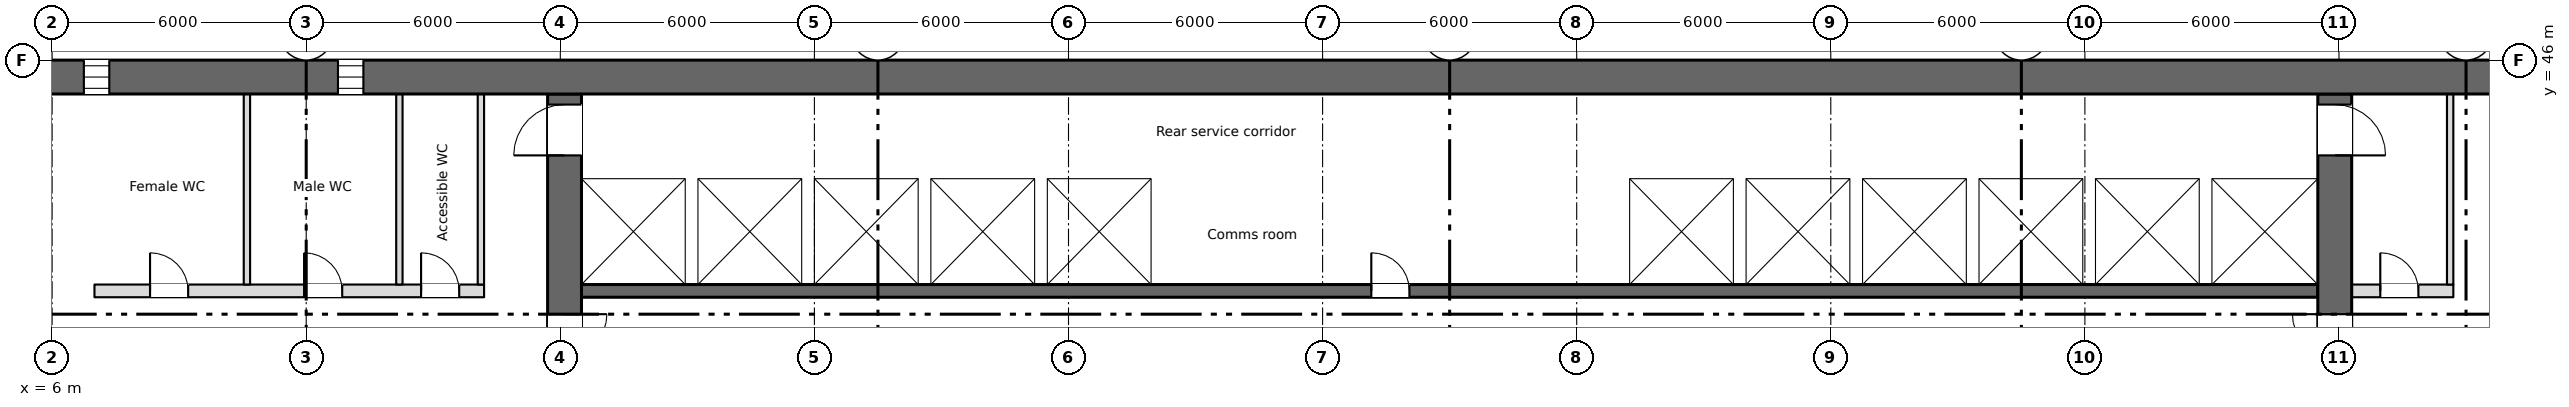
"""IFC4 building model, lengths in metres.
Left out: names, types, materials, properties, quantities, classifications, styles, units other than length and angle.
Written with IfcOpenShell. Run it as: python <this file> out.ifc"""

import sys

from ifc_helpers import new_model, si_unit, direction, frame, frame_2d, origin, place, context, subcontext, project, spatial, rectangle, extrude, element, fill, save


model = new_model("IFC4")
c1 = context("Model", 3, precision=1e-05, world=origin(), true_north=direction((0.0, 1.0)))
c2 = subcontext(c1, "Body", "Model", "MODEL_VIEW")
j1 = project(units=[si_unit("LENGTHUNIT", "METRE"), si_unit("PLANEANGLEUNIT", "RADIAN")], contexts=[c1])
p1 = place(None, origin())
s1 = spatial("IfcSite", under=j1, at=p1, CompositionType="ELEMENT")
p2 = place(p1, origin())
s2 = spatial("IfcBuilding", under=s1, at=p2, CompositionType="ELEMENT")
p3 = place(p2, frame((0.0, 0.0, 143.75)))
s3 = spatial("IfcBuildingStorey", under=s2, at=p3, CompositionType="ELEMENT", Elevation=143.75)
p4 = place(p3, frame((5.55, 45.6, 0.0), z_axis=(0.0, 0.0, 1.0), x_axis=(1.0, 0.0, 0.0)))
e1 = element("IfcWall", 1, at=p4, inside=s3, PredefinedType="SHEAR", context=c2, shape_type="SweptSolid", body=[
    extrude(rectangle(XDim=60.9, YDim=0.8, at=frame_2d((30.45, 0.0))), origin(), (0.0, 0.0, 1.0), 3.35),
])
p5 = place(p4, frame((1.2, 0.0, 0.6)))
e2 = element("IfcOpeningElement", 2, at=p5, cuts=e1, PredefinedType="OPENING", context=c2, shape_type="SweptSolid", body=[
    extrude(rectangle(XDim=0.6, YDim=2.4, at=frame_2d((0.3, 1.2))), frame((0.0, 0.41, 0.0), z_axis=(0.0, -1.0, 0.0), x_axis=(1.0, 0.0, 0.0)), (0.0, 0.0, 1.0), 0.82),
])
p6 = place(p4, frame((7.2, 0.0, 0.6)))
e3 = element("IfcOpeningElement", 3, at=p6, cuts=e1, PredefinedType="OPENING", context=c2, shape_type="SweptSolid", body=[
    extrude(rectangle(XDim=0.6, YDim=2.4, at=frame_2d((0.3, 1.2))), frame((0.0, 0.41, 0.0), z_axis=(0.0, -1.0, 0.0), x_axis=(1.0, 0.0, 0.0)), (0.0, 0.0, 1.0), 0.82),
])
p7 = place(p3, frame((6.85, 28.4, 0.0), z_axis=(0.0, 0.0, 1.0), x_axis=(0.0, 1.0, 0.0)))
e4 = element("IfcWall", 4, at=p7, inside=s3, PredefinedType="SHEAR", context=c2, shape_type="SweptSolid", body=[
    extrude(rectangle(XDim=16.8, YDim=0.3, at=frame_2d((8.4, 0.0))), origin(), (0.0, 0.0, 1.0), 3.35),
])
p8 = place(p3, frame((18.1, 28.4, 0.0), z_axis=(0.0, 0.0, 1.0), x_axis=(0.0, 1.0, 0.0)))
e5 = element("IfcWall", 5, at=p8, inside=s3, PredefinedType="SHEAR", context=c2, shape_type="SweptSolid", body=[
    extrude(rectangle(XDim=16.8, YDim=0.8, at=frame_2d((8.4, 0.0))), origin(), (0.0, 0.0, 1.0), 3.35),
])
p9 = place(p8, frame((9.6, 0.0, 0.0)))
e6 = element("IfcOpeningElement", 6, at=p9, cuts=e5, PredefinedType="OPENING", context=c2, shape_type="SweptSolid", body=[
    extrude(rectangle(XDim=2.0, YDim=2.1, at=frame_2d((1.0, 1.05))), frame((0.0, 0.41, 0.0), z_axis=(0.0, -1.0, 0.0), x_axis=(1.0, 0.0, 0.0)), (0.0, 0.0, 1.0), 0.82),
])
p10 = place(p8, frame((15.35, 0.0, 0.0)))
e7 = element("IfcOpeningElement", 7, at=p10, cuts=e5, PredefinedType="OPENING", context=c2, shape_type="SweptSolid", body=[
    extrude(rectangle(XDim=1.2, YDim=2.1, at=frame_2d((0.6, 1.05))), frame((0.0, 0.41, 0.0), z_axis=(0.0, -1.0, 0.0), x_axis=(1.0, 0.0, 0.0)), (0.0, 0.0, 1.0), 0.82),
])
p11 = place(p3, frame((59.9, 28.4, 0.0), z_axis=(0.0, 0.0, 1.0), x_axis=(0.0, 1.0, 0.0)))
e8 = element("IfcWall", 8, at=p11, inside=s3, PredefinedType="SHEAR", context=c2, shape_type="SweptSolid", body=[
    extrude(rectangle(XDim=16.8, YDim=0.8, at=frame_2d((8.4, 0.0))), origin(), (0.0, 0.0, 1.0), 3.35),
])
p12 = place(p11, frame((9.6, 0.0, 0.0)))
e9 = element("IfcOpeningElement", 9, at=p12, cuts=e8, PredefinedType="OPENING", context=c2, shape_type="SweptSolid", body=[
    extrude(rectangle(XDim=2.0, YDim=2.1, at=frame_2d((1.0, 1.05))), frame((0.0, 0.41, 0.0), z_axis=(0.0, -1.0, 0.0), x_axis=(1.0, 0.0, 0.0)), (0.0, 0.0, 1.0), 0.82),
])
p13 = place(p11, frame((15.35, 0.0, 0.0)))
e10 = element("IfcOpeningElement", 10, at=p13, cuts=e8, PredefinedType="OPENING", context=c2, shape_type="SweptSolid", body=[
    extrude(rectangle(XDim=1.2, YDim=2.1, at=frame_2d((0.6, 1.05))), frame((0.0, 0.41, 0.0), z_axis=(0.0, -1.0, 0.0), x_axis=(1.0, 0.0, 0.0)), (0.0, 0.0, 1.0), 0.82),
])
p14 = place(p3, frame((18.5, 40.55, 0.0), z_axis=(0.0, 0.0, 1.0), x_axis=(1.0, 0.0, 0.0)))
e11 = element("IfcWall", 11, at=p14, inside=s3, PredefinedType="SHEAR", context=c2, shape_type="SweptSolid", body=[
    extrude(rectangle(XDim=41.0, YDim=0.3, at=frame_2d((20.5, 0.0))), origin(), (0.0, 0.0, 1.0), 3.35),
])
p15 = place(p14, frame((18.65, 0.0, 0.0)))
e12 = element("IfcOpeningElement", 12, at=p15, cuts=e11, PredefinedType="OPENING", context=c2, shape_type="SweptSolid", body=[
    extrude(rectangle(XDim=0.9, YDim=2.1, at=frame_2d((0.45, 1.05))), frame((0.0, 0.16, 0.0), z_axis=(0.0, -1.0, 0.0), x_axis=(1.0, 0.0, 0.0)), (0.0, 0.0, 1.0), 0.32),
])
p16 = place(p14, frame((6.175, 0.0, 0.0)))
e13 = element("IfcOpeningElement", 13, at=p16, cuts=e11, PredefinedType="OPENING", context=c2, shape_type="SweptSolid", body=[
    extrude(rectangle(XDim=1.1, YDim=2.1, at=frame_2d((0.55, 1.05))), frame((0.0, 0.16, 0.0), z_axis=(0.0, -1.0, 0.0), x_axis=(1.0, 0.0, 0.0)), (0.0, 0.0, 1.0), 0.32),
])
p17 = place(p14, frame((8.925, 0.0, 0.0)))
e14 = element("IfcOpeningElement", 14, at=p17, cuts=e11, PredefinedType="OPENING", context=c2, shape_type="SweptSolid", body=[
    extrude(rectangle(XDim=1.1, YDim=2.1, at=frame_2d((0.55, 1.05))), frame((0.0, 0.16, 0.0), z_axis=(0.0, -1.0, 0.0), x_axis=(1.0, 0.0, 0.0)), (0.0, 0.0, 1.0), 0.32),
])
p18 = place(p14, frame((11.675, 0.0, 0.0)))
e15 = element("IfcOpeningElement", 15, at=p18, cuts=e11, PredefinedType="OPENING", context=c2, shape_type="SweptSolid", body=[
    extrude(rectangle(XDim=1.1, YDim=2.1, at=frame_2d((0.55, 1.05))), frame((0.0, 0.16, 0.0), z_axis=(0.0, -1.0, 0.0), x_axis=(1.0, 0.0, 0.0)), (0.0, 0.0, 1.0), 0.32),
])
p19 = place(p14, frame((30.925, 0.0, 0.0)))
e16 = element("IfcOpeningElement", 16, at=p19, cuts=e11, PredefinedType="OPENING", context=c2, shape_type="SweptSolid", body=[
    extrude(rectangle(XDim=1.1, YDim=2.1, at=frame_2d((0.55, 1.05))), frame((0.0, 0.16, 0.0), z_axis=(0.0, -1.0, 0.0), x_axis=(1.0, 0.0, 0.0)), (0.0, 0.0, 1.0), 0.32),
])
p20 = place(p14, frame((33.675, 0.0, 0.0)))
e17 = element("IfcOpeningElement", 17, at=p20, cuts=e11, PredefinedType="OPENING", context=c2, shape_type="SweptSolid", body=[
    extrude(rectangle(XDim=1.1, YDim=2.1, at=frame_2d((0.55, 1.05))), frame((0.0, 0.16, 0.0), z_axis=(0.0, -1.0, 0.0), x_axis=(1.0, 0.0, 0.0)), (0.0, 0.0, 1.0), 0.32),
])
p21 = place(p14, frame((36.375, 0.0, 0.0)))
e18 = element("IfcOpeningElement", 18, at=p21, cuts=e11, PredefinedType="OPENING", context=c2, shape_type="SweptSolid", body=[
    extrude(rectangle(XDim=1.2, YDim=2.1, at=frame_2d((0.6, 1.05))), frame((0.0, 0.16, 0.0), z_axis=(0.0, -1.0, 0.0), x_axis=(1.0, 0.0, 0.0)), (0.0, 0.0, 1.0), 0.32),
])
p22 = place(p14, frame((39.15, 0.0, 0.0)))
e19 = element("IfcOpeningElement", 19, at=p22, cuts=e11, PredefinedType="OPENING", context=c2, shape_type="SweptSolid", body=[
    extrude(rectangle(XDim=1.2, YDim=2.1, at=frame_2d((0.6, 1.05))), frame((0.0, 0.16, 0.0), z_axis=(0.0, -1.0, 0.0), x_axis=(1.0, 0.0, 0.0)), (0.0, 0.0, 1.0), 0.32),
])
p23 = place(p3, frame((18.5, 43.35, 0.0), z_axis=(0.0, 0.0, 1.0), x_axis=(1.0, 0.0, 0.0)))
e20 = element("IfcWall", 20, at=p23, inside=s3, PredefinedType="SHEAR", context=c2, shape_type="SweptSolid", body=[
    extrude(rectangle(XDim=41.0, YDim=0.3, at=frame_2d((20.5, 0.0))), origin(), (0.0, 0.0, 1.0), 3.35),
])
p24 = place(p3, frame((7.0, 40.55, 0.0), z_axis=(0.0, 0.0, 1.0), x_axis=(1.0, 0.0, 0.0)))
e21 = element("IfcWall", 21, at=p24, inside=s3, PredefinedType="PARTITIONING", context=c2, shape_type="SweptSolid", body=[
    extrude(rectangle(XDim=9.2, YDim=0.3, at=frame_2d((4.6, 0.0))), origin(), (0.0, 0.0, 1.0), 3.35),
])
p25 = place(p24, frame((1.312, 0.0, 0.0)))
e22 = element("IfcOpeningElement", 22, at=p25, cuts=e21, PredefinedType="OPENING", context=c2, shape_type="SweptSolid", body=[
    extrude(rectangle(XDim=0.9, YDim=2.1, at=frame_2d((0.45, 1.05))), frame((0.0, 0.16, 0.0), z_axis=(0.0, -1.0, 0.0), x_axis=(1.0, 0.0, 0.0)), (0.0, 0.0, 1.0), 0.32),
])
p26 = place(p24, frame((4.95, 0.0, 0.0)))
e23 = element("IfcOpeningElement", 23, at=p26, cuts=e21, PredefinedType="OPENING", context=c2, shape_type="SweptSolid", body=[
    extrude(rectangle(XDim=0.9, YDim=2.1, at=frame_2d((0.45, 1.05))), frame((0.0, 0.16, 0.0), z_axis=(0.0, -1.0, 0.0), x_axis=(1.0, 0.0, 0.0)), (0.0, 0.0, 1.0), 0.32),
])
p27 = place(p24, frame((7.712, 0.0, 0.0)))
e24 = element("IfcOpeningElement", 24, at=p27, cuts=e21, PredefinedType="OPENING", context=c2, shape_type="SweptSolid", body=[
    extrude(rectangle(XDim=0.9, YDim=2.1, at=frame_2d((0.45, 1.05))), frame((0.0, 0.16, 0.0), z_axis=(0.0, -1.0, 0.0), x_axis=(1.0, 0.0, 0.0)), (0.0, 0.0, 1.0), 0.32),
])
p28 = place(p3, frame((60.3, 40.55, 0.0), z_axis=(0.0, 0.0, 1.0), x_axis=(1.0, 0.0, 0.0)))
e25 = element("IfcWall", 25, at=p28, inside=s3, PredefinedType="PARTITIONING", context=c2, shape_type="SweptSolid", body=[
    extrude(rectangle(XDim=2.4, YDim=0.3, at=frame_2d((1.2, 0.0))), origin(), (0.0, 0.0, 1.0), 3.35),
])
p29 = place(p28, frame((0.675, 0.0, 0.0)))
e26 = element("IfcOpeningElement", 26, at=p29, cuts=e25, PredefinedType="OPENING", context=c2, shape_type="SweptSolid", body=[
    extrude(rectangle(XDim=0.9, YDim=2.1, at=frame_2d((0.45, 1.05))), frame((0.0, 0.16, 0.0), z_axis=(0.0, -1.0, 0.0), x_axis=(1.0, 0.0, 0.0)), (0.0, 0.0, 1.0), 0.32),
])
for number, where, z_axis, x_axis in (
    (27, (21.1, 40.7, 0.0), (0.0, 0.0, 1.0), (0.0, 1.0, 0.0)),
    (28, (23.85, 40.7, 0.0), (0.0, 0.0, 1.0), (0.0, 1.0, 0.0)),
    (29, (26.6, 40.7, 0.0), (0.0, 0.0, 1.0), (0.0, 1.0, 0.0)),
    (30, (29.35, 40.7, 0.0), (0.0, 0.0, 1.0), (0.0, 1.0, 0.0)),
    (31, (32.1, 40.7, 0.0), (0.0, 0.0, 1.0), (0.0, 1.0, 0.0)),
    (32, (43.1, 40.7, 0.0), (0.0, 0.0, 1.0), (0.0, 1.0, 0.0)),
    (33, (45.85, 40.7, 0.0), (0.0, 0.0, 1.0), (0.0, 1.0, 0.0)),
    (34, (48.6, 40.7, 0.0), (0.0, 0.0, 1.0), (0.0, 1.0, 0.0)),
    (35, (51.35, 40.7, 0.0), (0.0, 0.0, 1.0), (0.0, 1.0, 0.0)),
    (36, (54.1, 40.7, 0.0), (0.0, 0.0, 1.0), (0.0, 1.0, 0.0)),
    (37, (56.85, 40.7, 0.0), (0.0, 0.0, 1.0), (0.0, 1.0, 0.0)),
):
    element("IfcWall", number, at=place(p3, frame(where, z_axis=z_axis, x_axis=x_axis)), inside=s3, PredefinedType="SHEAR", context=c2, shape_type="SweptSolid", body=[
        extrude(rectangle(XDim=2.5, YDim=0.3, at=frame_2d((1.25, 0.0))), origin(), (0.0, 0.0, 1.0), 3.35),
    ])
for number, where, z_axis, x_axis in (
    (38, (16.125, 40.7, 0.0), (0.0, 0.0, 1.0), (0.0, 1.0, 0.0)),
    (39, (62.625, 40.7, 0.0), (0.0, 0.0, 1.0), (0.0, 1.0, 0.0)),
    (40, (10.6, 40.7, 0.0), (0.0, 0.0, 1.0), (0.0, 1.0, 0.0)),
    (41, (14.2, 40.7, 0.0), (0.0, 0.0, 1.0), (0.0, 1.0, 0.0)),
):
    element("IfcWall", number, at=place(p3, frame(where, z_axis=z_axis, x_axis=x_axis)), inside=s3, PredefinedType="PARTITIONING", context=c2, shape_type="SweptSolid", body=[
        extrude(rectangle(XDim=4.5, YDim=0.15, at=frame_2d((2.25, 0.0))), origin(), (0.0, 0.0, 1.0), 3.35),
    ])
p30 = place(p5, origin())
e42 = element("IfcWindow", 42, at=p30, inside=s3, PartitioningType="SINGLE_PANEL", PredefinedType="WINDOW", context=c2, shape_type="SweptSolid", body=[
    extrude(rectangle(XDim=0.6, YDim=2.4, at=frame_2d((0.3, 1.2))), frame((0.0, 0.03, 0.0), z_axis=(0.0, -1.0, 0.0), x_axis=(1.0, 0.0, 0.0)), (0.0, 0.0, 1.0), 0.06),
])
fill(e2, e42)
p31 = place(p6, origin())
e43 = element("IfcWindow", 43, at=p31, inside=s3, PartitioningType="SINGLE_PANEL", PredefinedType="WINDOW", context=c2, shape_type="SweptSolid", body=[
    extrude(rectangle(XDim=0.6, YDim=2.4, at=frame_2d((0.3, 1.2))), frame((0.0, 0.03, 0.0), z_axis=(0.0, -1.0, 0.0), x_axis=(1.0, 0.0, 0.0)), (0.0, 0.0, 1.0), 0.06),
])
fill(e3, e43)
p32 = place(p25, origin())
e44 = element("IfcDoor", 44, at=p32, inside=s3, OperationType="SINGLE_SWING_LEFT", PredefinedType="DOOR", context=c2, shape_type="SweptSolid", body=[
    extrude(rectangle(XDim=0.9, YDim=2.1, at=frame_2d((0.45, 1.05))), frame((0.0, 0.025, 0.0), z_axis=(0.0, -1.0, 0.0), x_axis=(1.0, 0.0, 0.0)), (0.0, 0.0, 1.0), 0.05),
])
fill(e22, e44)
p33 = place(p26, origin())
e45 = element("IfcDoor", 45, at=p33, inside=s3, OperationType="SINGLE_SWING_LEFT", PredefinedType="DOOR", context=c2, shape_type="SweptSolid", body=[
    extrude(rectangle(XDim=0.9, YDim=2.1, at=frame_2d((0.45, 1.05))), frame((0.0, 0.025, 0.0), z_axis=(0.0, -1.0, 0.0), x_axis=(1.0, 0.0, 0.0)), (0.0, 0.0, 1.0), 0.05),
])
fill(e23, e45)
p34 = place(p27, origin())
e46 = element("IfcDoor", 46, at=p34, inside=s3, OperationType="SINGLE_SWING_LEFT", PredefinedType="DOOR", context=c2, shape_type="SweptSolid", body=[
    extrude(rectangle(XDim=0.9, YDim=2.1, at=frame_2d((0.45, 1.05))), frame((0.0, 0.025, 0.0), z_axis=(0.0, -1.0, 0.0), x_axis=(1.0, 0.0, 0.0)), (0.0, 0.0, 1.0), 0.05),
])
fill(e24, e46)
p35 = place(p29, origin())
e47 = element("IfcDoor", 47, at=p35, inside=s3, OperationType="SINGLE_SWING_LEFT", PredefinedType="DOOR", context=c2, shape_type="SweptSolid", body=[
    extrude(rectangle(XDim=0.9, YDim=2.1, at=frame_2d((0.45, 1.05))), frame((0.0, 0.025, 0.0), z_axis=(0.0, -1.0, 0.0), x_axis=(1.0, 0.0, 0.0)), (0.0, 0.0, 1.0), 0.05),
])
fill(e26, e47)
p36 = place(p15, origin())
e48 = element("IfcDoor", 48, at=p36, inside=s3, OperationType="SINGLE_SWING_LEFT", PredefinedType="DOOR", context=c2, shape_type="SweptSolid", body=[
    extrude(rectangle(XDim=0.9, YDim=2.1, at=frame_2d((0.45, 1.05))), frame((0.0, 0.025, 0.0), z_axis=(0.0, -1.0, 0.0), x_axis=(1.0, 0.0, 0.0)), (0.0, 0.0, 1.0), 0.05),
])
fill(e12, e48)
p37 = place(p16, origin())
e49 = element("IfcDoor", 49, at=p37, inside=s3, OperationType="SLIDING_TO_LEFT", PredefinedType="DOOR", context=c2, shape_type="SweptSolid", body=[
    extrude(rectangle(XDim=1.1, YDim=2.1, at=frame_2d((0.55, 1.05))), frame((0.0, 0.025, 0.0), z_axis=(0.0, -1.0, 0.0), x_axis=(1.0, 0.0, 0.0)), (0.0, 0.0, 1.0), 0.05),
])
fill(e13, e49)
p38 = place(p17, origin())
e50 = element("IfcDoor", 50, at=p38, inside=s3, OperationType="SLIDING_TO_LEFT", PredefinedType="DOOR", context=c2, shape_type="SweptSolid", body=[
    extrude(rectangle(XDim=1.1, YDim=2.1, at=frame_2d((0.55, 1.05))), frame((0.0, 0.025, 0.0), z_axis=(0.0, -1.0, 0.0), x_axis=(1.0, 0.0, 0.0)), (0.0, 0.0, 1.0), 0.05),
])
fill(e14, e50)
p39 = place(p18, origin())
e51 = element("IfcDoor", 51, at=p39, inside=s3, OperationType="SLIDING_TO_LEFT", PredefinedType="DOOR", context=c2, shape_type="SweptSolid", body=[
    extrude(rectangle(XDim=1.1, YDim=2.1, at=frame_2d((0.55, 1.05))), frame((0.0, 0.025, 0.0), z_axis=(0.0, -1.0, 0.0), x_axis=(1.0, 0.0, 0.0)), (0.0, 0.0, 1.0), 0.05),
])
fill(e15, e51)
p40 = place(p19, origin())
e52 = element("IfcDoor", 52, at=p40, inside=s3, OperationType="SLIDING_TO_LEFT", PredefinedType="DOOR", context=c2, shape_type="SweptSolid", body=[
    extrude(rectangle(XDim=1.1, YDim=2.1, at=frame_2d((0.55, 1.05))), frame((0.0, 0.025, 0.0), z_axis=(0.0, -1.0, 0.0), x_axis=(1.0, 0.0, 0.0)), (0.0, 0.0, 1.0), 0.05),
])
fill(e16, e52)
p41 = place(p20, origin())
e53 = element("IfcDoor", 53, at=p41, inside=s3, OperationType="SLIDING_TO_LEFT", PredefinedType="DOOR", context=c2, shape_type="SweptSolid", body=[
    extrude(rectangle(XDim=1.1, YDim=2.1, at=frame_2d((0.55, 1.05))), frame((0.0, 0.025, 0.0), z_axis=(0.0, -1.0, 0.0), x_axis=(1.0, 0.0, 0.0)), (0.0, 0.0, 1.0), 0.05),
])
fill(e17, e53)
p42 = place(p21, origin())
e54 = element("IfcDoor", 54, at=p42, inside=s3, OperationType="SLIDING_TO_LEFT", PredefinedType="DOOR", context=c2, shape_type="SweptSolid", body=[
    extrude(rectangle(XDim=1.2, YDim=2.1, at=frame_2d((0.6, 1.05))), frame((0.0, 0.025, 0.0), z_axis=(0.0, -1.0, 0.0), x_axis=(1.0, 0.0, 0.0)), (0.0, 0.0, 1.0), 0.05),
])
fill(e18, e54)
p43 = place(p22, origin())
e55 = element("IfcDoor", 55, at=p43, inside=s3, OperationType="SLIDING_TO_LEFT", PredefinedType="DOOR", context=c2, shape_type="SweptSolid", body=[
    extrude(rectangle(XDim=1.2, YDim=2.1, at=frame_2d((0.6, 1.05))), frame((0.0, 0.025, 0.0), z_axis=(0.0, -1.0, 0.0), x_axis=(1.0, 0.0, 0.0)), (0.0, 0.0, 1.0), 0.05),
])
fill(e19, e55)
p44 = place(p9, origin())
e56 = element("IfcDoor", 56, at=p44, inside=s3, OperationType="DOUBLE_DOOR_SINGLE_SWING", PredefinedType="DOOR", context=c2, shape_type="SweptSolid", body=[
    extrude(rectangle(XDim=2.0, YDim=2.1, at=frame_2d((1.0, 1.05))), frame((0.0, 0.025, 0.0), z_axis=(0.0, -1.0, 0.0), x_axis=(1.0, 0.0, 0.0)), (0.0, 0.0, 1.0), 0.05),
])
fill(e6, e56)
p45 = place(p12, origin())
e57 = element("IfcDoor", 57, at=p45, inside=s3, OperationType="DOUBLE_DOOR_SINGLE_SWING", PredefinedType="DOOR", context=c2, shape_type="SweptSolid", body=[
    extrude(rectangle(XDim=2.0, YDim=2.1, at=frame_2d((1.0, 1.05))), frame((0.0, 0.025, 0.0), z_axis=(0.0, -1.0, 0.0), x_axis=(1.0, 0.0, 0.0)), (0.0, 0.0, 1.0), 0.05),
])
fill(e9, e57)
p46 = place(p10, origin())
e58 = element("IfcDoor", 58, at=p46, inside=s3, OperationType="SINGLE_SWING_LEFT", PredefinedType="DOOR", context=c2, shape_type="SweptSolid", body=[
    extrude(rectangle(XDim=1.2, YDim=2.1, at=frame_2d((0.6, 1.05))), frame((0.0, 0.025, 0.0), z_axis=(0.0, -1.0, 0.0), x_axis=(1.0, 0.0, 0.0)), (0.0, 0.0, 1.0), 0.05),
])
fill(e7, e58)
p47 = place(p13, origin())
e59 = element("IfcDoor", 59, at=p47, inside=s3, OperationType="SINGLE_SWING_LEFT", PredefinedType="DOOR", context=c2, shape_type="SweptSolid", body=[
    extrude(rectangle(XDim=1.2, YDim=2.1, at=frame_2d((0.6, 1.05))), frame((0.0, 0.025, 0.0), z_axis=(0.0, -1.0, 0.0), x_axis=(1.0, 0.0, 0.0)), (0.0, 0.0, 1.0), 0.05),
])
fill(e10, e59)
save(model, sys.argv[1])
